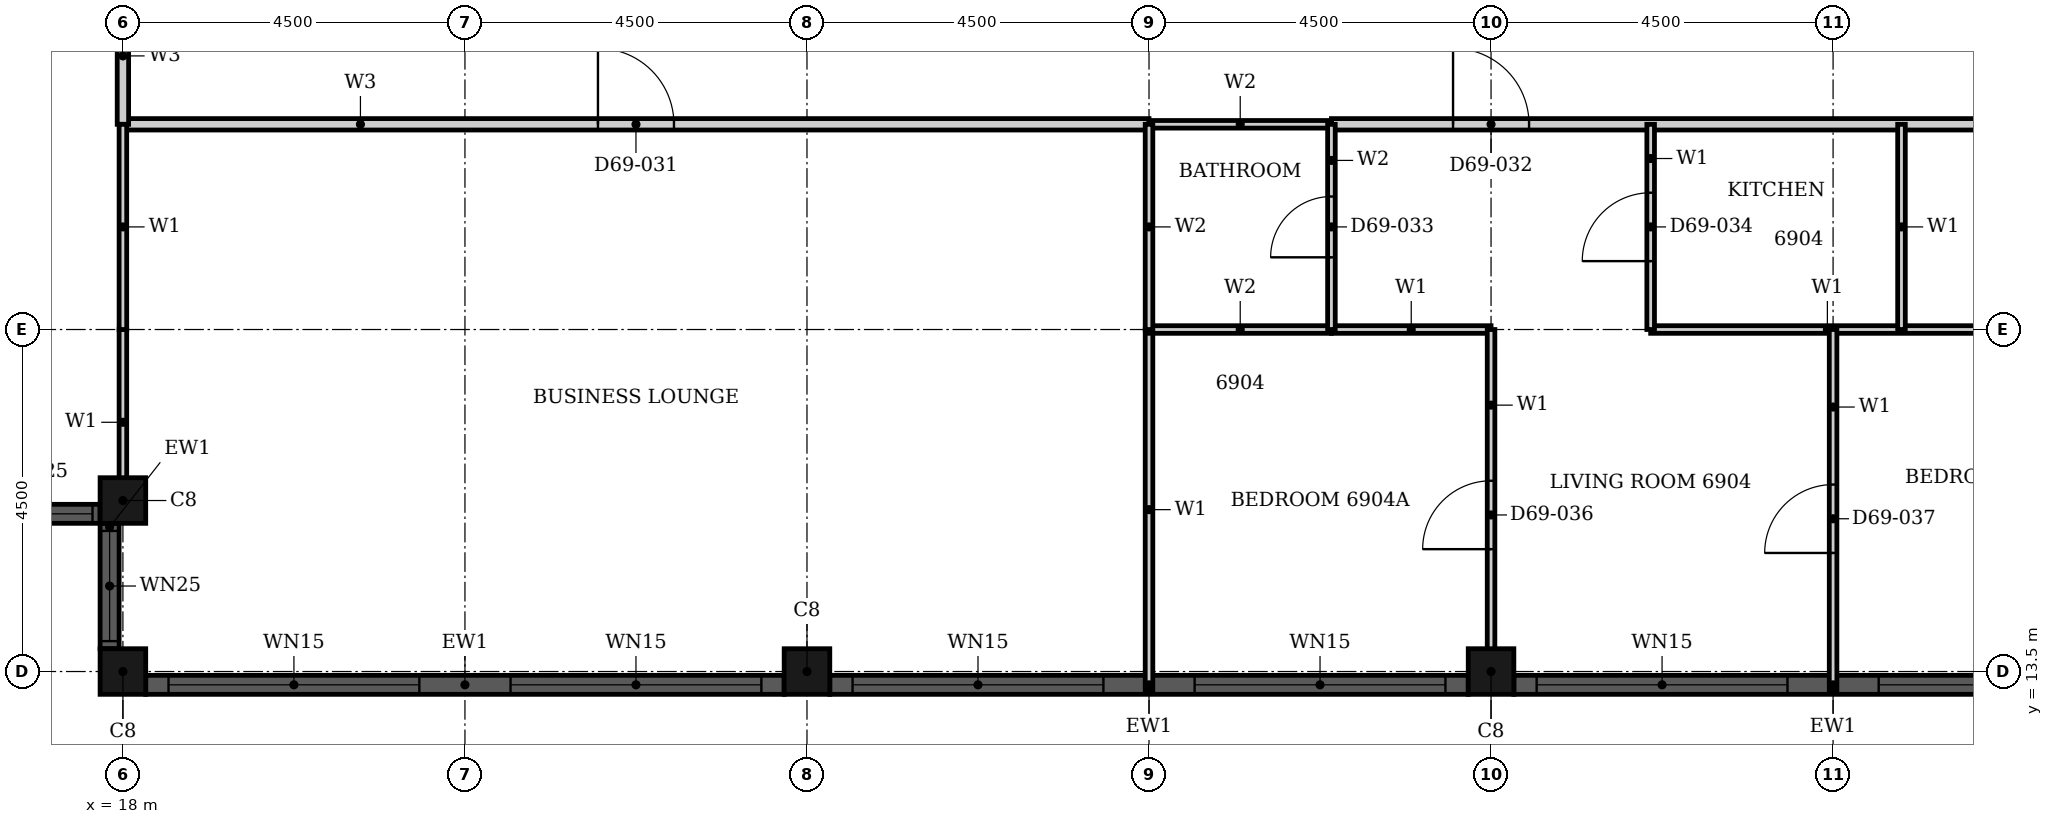
"""IFC4 building model, lengths in metres.
Left out: names, types, materials, properties, quantities, classifications, styles, units other than length and angle.
Written with IfcOpenShell. Run it as: python <this file> out.ifc"""

import sys

from ifc_helpers import new_model, si_unit, direction, frame, frame_2d, origin, origin_2d, place, context, subcontext, project, spatial, rectangle, hollow_rectangle, extrude, element, fill, save


model = new_model("IFC4")
c1 = context("Model", 3, precision=1e-05, world=origin(), true_north=direction((0.0, 1.0)))
c2 = subcontext(c1, "Body", "Model", "MODEL_VIEW")
j1 = project(units=[si_unit("LENGTHUNIT", "METRE"), si_unit("PLANEANGLEUNIT", "RADIAN")], contexts=[c1])
p1 = place(None, origin())
s1 = spatial("IfcSite", under=j1, at=p1, CompositionType="ELEMENT")
p2 = place(p1, origin())
s2 = spatial("IfcBuilding", under=s1, at=p2, CompositionType="ELEMENT")
p3 = place(p2, frame((0.0, 0.0, 271.2)))
s3 = spatial("IfcBuildingStorey", under=s2, at=p3, CompositionType="ELEMENT", Elevation=271.2)
for number, where, z_axis, x_axis in (
    (1, (18.0, 15.75, 0.0), (0.0, 0.0, 1.0), (1.0, 0.0, 0.0)),
    (2, (18.0, 13.5, 0.0), (0.0, 0.0, 1.0), (1.0, 0.0, 0.0)),
    (3, (27.0, 13.5, 0.0), (0.0, 0.0, 1.0), (1.0, 0.0, 0.0)),
    (4, (36.0, 13.5, 0.0), (0.0, 0.0, 1.0), (1.0, 0.0, 0.0)),
):
    element("IfcColumn", number, at=place(p3, frame(where, z_axis=z_axis, x_axis=x_axis)), inside=s3, PredefinedType="COLUMN", context=c2, shape_type="SweptSolid", body=[
        extrude(hollow_rectangle(XDim=0.6, YDim=0.6, WallThickness=0.02, at=origin_2d()), origin(), (0.0, 0.0, 1.0), 3.7),
    ])
p4 = place(p3, frame((16.05, 15.575, 0.0), z_axis=(0.0, 0.0, 1.0), x_axis=(1.0, 0.0, 0.0)))
e5 = element("IfcWall", 5, at=p4, inside=s3, PredefinedType="SOLIDWALL", context=c2, shape_type="SweptSolid", body=[
    extrude(rectangle(XDim=1.65, YDim=0.25, at=frame_2d((0.825, 0.0))), origin(), (0.0, 0.0, 1.0), 3.7),
])
p5 = place(p4, frame((0.1, 0.0, 0.9)))
e6 = element("IfcOpeningElement", 6, at=p5, cuts=e5, PredefinedType="OPENING", context=c2, shape_type="SweptSolid", body=[
    extrude(rectangle(XDim=1.45, YDim=1.85, at=frame_2d((0.725, 0.925))), frame((0.0, 0.135, 0.0), z_axis=(0.0, -1.0, 0.0), x_axis=(1.0, 0.0, 0.0)), (0.0, 0.0, 1.0), 0.27),
])
p6 = place(p3, frame((17.825, 15.45, 0.0), z_axis=(0.0, 0.0, 1.0), x_axis=(0.0, -1.0, 0.0)))
e7 = element("IfcWall", 7, at=p6, inside=s3, PredefinedType="SOLIDWALL", context=c2, shape_type="SweptSolid", body=[
    extrude(rectangle(XDim=1.65, YDim=0.25, at=frame_2d((0.825, 0.0))), origin(), (0.0, 0.0, 1.0), 3.7),
])
p7 = place(p6, frame((0.1, 0.0, 0.9)))
e8 = element("IfcOpeningElement", 8, at=p7, cuts=e7, PredefinedType="OPENING", context=c2, shape_type="SweptSolid", body=[
    extrude(rectangle(XDim=1.45, YDim=1.85, at=frame_2d((0.725, 0.925))), frame((0.0, 0.135, 0.0), z_axis=(0.0, -1.0, 0.0), x_axis=(1.0, 0.0, 0.0)), (0.0, 0.0, 1.0), 0.27),
])
p8 = place(p3, frame((18.3, 13.325, 0.0), z_axis=(0.0, 0.0, 1.0), x_axis=(1.0, 0.0, 0.0)))
e9 = element("IfcWall", 9, at=p8, inside=s3, PredefinedType="SOLIDWALL", context=c2, shape_type="SweptSolid", body=[
    extrude(rectangle(XDim=8.4, YDim=0.25, at=frame_2d((4.2, 0.0))), origin(), (0.0, 0.0, 1.0), 3.7),
])
p9 = place(p8, frame((0.3, 0.0, 0.45)))
e10 = element("IfcOpeningElement", 10, at=p9, cuts=e9, PredefinedType="OPENING", context=c2, shape_type="SweptSolid", body=[
    extrude(rectangle(XDim=3.3, YDim=2.3, at=frame_2d((1.65, 1.15))), frame((0.0, 0.135, 0.0), z_axis=(0.0, -1.0, 0.0), x_axis=(1.0, 0.0, 0.0)), (0.0, 0.0, 1.0), 0.27),
])
p10 = place(p8, frame((4.8, 0.0, 0.45)))
e11 = element("IfcOpeningElement", 11, at=p10, cuts=e9, PredefinedType="OPENING", context=c2, shape_type="SweptSolid", body=[
    extrude(rectangle(XDim=3.3, YDim=2.3, at=frame_2d((1.65, 1.15))), frame((0.0, 0.135, 0.0), z_axis=(0.0, -1.0, 0.0), x_axis=(1.0, 0.0, 0.0)), (0.0, 0.0, 1.0), 0.27),
])
p11 = place(p3, frame((27.3, 13.325, 0.0), z_axis=(0.0, 0.0, 1.0), x_axis=(1.0, 0.0, 0.0)))
e12 = element("IfcWall", 12, at=p11, inside=s3, PredefinedType="SOLIDWALL", context=c2, shape_type="SweptSolid", body=[
    extrude(rectangle(XDim=8.4, YDim=0.25, at=frame_2d((4.2, 0.0))), origin(), (0.0, 0.0, 1.0), 3.7),
])
p12 = place(p11, frame((0.3, 0.0, 0.45)))
e13 = element("IfcOpeningElement", 13, at=p12, cuts=e12, PredefinedType="OPENING", context=c2, shape_type="SweptSolid", body=[
    extrude(rectangle(XDim=3.3, YDim=2.3, at=frame_2d((1.65, 1.15))), frame((0.0, 0.135, 0.0), z_axis=(0.0, -1.0, 0.0), x_axis=(1.0, 0.0, 0.0)), (0.0, 0.0, 1.0), 0.27),
])
p13 = place(p11, frame((4.8, 0.0, 0.45)))
e14 = element("IfcOpeningElement", 14, at=p13, cuts=e12, PredefinedType="OPENING", context=c2, shape_type="SweptSolid", body=[
    extrude(rectangle(XDim=3.3, YDim=2.3, at=frame_2d((1.65, 1.15))), frame((0.0, 0.135, 0.0), z_axis=(0.0, -1.0, 0.0), x_axis=(1.0, 0.0, 0.0)), (0.0, 0.0, 1.0), 0.27),
])
p14 = place(p3, frame((36.3, 13.325, 0.0), z_axis=(0.0, 0.0, 1.0), x_axis=(1.0, 0.0, 0.0)))
e15 = element("IfcWall", 15, at=p14, inside=s3, PredefinedType="SOLIDWALL", context=c2, shape_type="SweptSolid", body=[
    extrude(rectangle(XDim=8.4, YDim=0.25, at=frame_2d((4.2, 0.0))), origin(), (0.0, 0.0, 1.0), 3.7),
])
p15 = place(p14, frame((0.3, 0.0, 0.45)))
e16 = element("IfcOpeningElement", 16, at=p15, cuts=e15, PredefinedType="OPENING", context=c2, shape_type="SweptSolid", body=[
    extrude(rectangle(XDim=3.3, YDim=2.3, at=frame_2d((1.65, 1.15))), frame((0.0, 0.135, 0.0), z_axis=(0.0, -1.0, 0.0), x_axis=(1.0, 0.0, 0.0)), (0.0, 0.0, 1.0), 0.27),
])
p16 = place(p14, frame((4.8, 0.0, 0.45)))
e17 = element("IfcOpeningElement", 17, at=p16, cuts=e15, PredefinedType="OPENING", context=c2, shape_type="SweptSolid", body=[
    extrude(rectangle(XDim=3.3, YDim=2.3, at=frame_2d((1.65, 1.15))), frame((0.0, 0.135, 0.0), z_axis=(0.0, -1.0, 0.0), x_axis=(1.0, 0.0, 0.0)), (0.0, 0.0, 1.0), 0.27),
])
p17 = place(p3, frame((18.0, 20.7, 0.0), z_axis=(0.0, 0.0, 1.0), x_axis=(1.0, 0.0, 0.0)))
e18 = element("IfcWall", 18, at=p17, inside=s3, PredefinedType="PARTITIONING", context=c2, shape_type="SweptSolid", body=[
    extrude(rectangle(XDim=13.5, YDim=0.15, at=frame_2d((6.75, 0.0))), origin(), (0.0, 0.0, 1.0), 3.4),
])
p18 = place(p17, frame((6.25, 0.0, 0.0)))
e19 = element("IfcOpeningElement", 19, at=p18, cuts=e18, PredefinedType="OPENING", context=c2, shape_type="SweptSolid", body=[
    extrude(rectangle(XDim=1.0, YDim=2.1, at=frame_2d((0.5, 1.05))), frame((0.0, 0.085, 0.0), z_axis=(0.0, -1.0, 0.0), x_axis=(1.0, 0.0, 0.0)), (0.0, 0.0, 1.0), 0.17),
])
p19 = place(p3, frame((33.9, 20.7, 0.0), z_axis=(0.0, 0.0, 1.0), x_axis=(1.0, 0.0, 0.0)))
e20 = element("IfcWall", 20, at=p19, inside=s3, PredefinedType="PARTITIONING", context=c2, shape_type="SweptSolid", body=[
    extrude(rectangle(XDim=15.65, YDim=0.15, at=frame_2d((7.825, 0.0))), origin(), (0.0, 0.0, 1.0), 3.4),
])
p20 = place(p19, frame((1.6, 0.0, 0.0)))
e21 = element("IfcOpeningElement", 21, at=p20, cuts=e20, PredefinedType="OPENING", context=c2, shape_type="SweptSolid", body=[
    extrude(rectangle(XDim=1.0, YDim=2.2, at=frame_2d((0.5, 1.1))), frame((0.0, 0.085, 0.0), z_axis=(0.0, -1.0, 0.0), x_axis=(1.0, 0.0, 0.0)), (0.0, 0.0, 1.0), 0.17),
])
p21 = place(p3, frame((18.0, 20.7, 0.0), z_axis=(0.0, 0.0, 1.0), x_axis=(0.0, 1.0, 0.0)))
e22 = element("IfcWall", 22, at=p21, inside=s3, PredefinedType="PARTITIONING", context=c2, shape_type="SweptSolid", body=[
    extrude(rectangle(XDim=1.8, YDim=0.15, at=frame_2d((0.9, 0.0))), origin(), (0.0, 0.0, 1.0), 3.4),
])
p22 = place(p3, frame((33.9, 18.0, 0.0), z_axis=(0.0, 0.0, 1.0), x_axis=(1.0, 0.0, 0.0)))
e23 = element("IfcWall", 23, at=p22, inside=s3, PredefinedType="PARTITIONING", context=c2, shape_type="SweptSolid", body=[
    extrude(rectangle(XDim=2.1, YDim=0.1, at=frame_2d((1.05, 0.0))), origin(), (0.0, 0.0, 1.0), 3.4),
])
p23 = place(p3, frame((38.1, 18.0, 0.0), z_axis=(0.0, 0.0, 1.0), x_axis=(1.0, 0.0, 0.0)))
e24 = element("IfcWall", 24, at=p23, inside=s3, PredefinedType="PARTITIONING", context=c2, shape_type="SweptSolid", body=[
    extrude(rectangle(XDim=6.9, YDim=0.1, at=frame_2d((3.45, 0.0))), origin(), (0.0, 0.0, 1.0), 3.4),
])
p24 = place(p23, frame((4.65, 0.0, 0.0)))
e25 = element("IfcOpeningElement", 25, at=p24, cuts=e24, PredefinedType="OPENING", context=c2, shape_type="SweptSolid", body=[
    extrude(rectangle(XDim=0.9, YDim=2.1, at=frame_2d((0.45, 1.05))), frame((0.0, 0.06, 0.0), z_axis=(0.0, -1.0, 0.0), x_axis=(1.0, 0.0, 0.0)), (0.0, 0.0, 1.0), 0.12),
])
p25 = place(p3, frame((18.0, 15.56, 0.0), z_axis=(0.0, 0.0, 1.0), x_axis=(0.0, 1.0, 0.0)))
e26 = element("IfcWall", 26, at=p25, inside=s3, PredefinedType="PARTITIONING", context=c2, shape_type="SweptSolid", body=[
    extrude(rectangle(XDim=2.439, YDim=0.1, at=frame_2d((1.219, 0.0))), origin(), (0.0, 0.0, 1.0), 3.4),
])
p26 = place(p3, frame((18.0, 18.0, 0.0), z_axis=(0.0, 0.0, 1.0), x_axis=(0.0, 1.0, 0.0)))
e27 = element("IfcWall", 27, at=p26, inside=s3, PredefinedType="PARTITIONING", context=c2, shape_type="SweptSolid", body=[
    extrude(rectangle(XDim=2.7, YDim=0.1, at=frame_2d((1.35, 0.0))), origin(), (0.0, 0.0, 1.0), 3.4),
])
p27 = place(p3, frame((31.5, 13.26, 0.0), z_axis=(0.0, 0.0, 1.0), x_axis=(0.0, 1.0, 0.0)))
e28 = element("IfcWall", 28, at=p27, inside=s3, PredefinedType="PARTITIONING", context=c2, shape_type="SweptSolid", body=[
    extrude(rectangle(XDim=4.74, YDim=0.1, at=frame_2d((2.37, 0.0))), origin(), (0.0, 0.0, 1.0), 3.4),
])
p28 = place(p3, frame((36.0, 13.31, 0.0), z_axis=(0.0, 0.0, 1.0), x_axis=(0.0, 1.0, 0.0)))
e29 = element("IfcWall", 29, at=p28, inside=s3, PredefinedType="PARTITIONING", context=c2, shape_type="SweptSolid", body=[
    extrude(rectangle(XDim=4.69, YDim=0.1, at=frame_2d((2.345, 0.0))), origin(), (0.0, 0.0, 1.0), 3.4),
])
p29 = place(p28, frame((1.8, 0.0, 0.0)))
e30 = element("IfcOpeningElement", 30, at=p29, cuts=e29, PredefinedType="OPENING", context=c2, shape_type="SweptSolid", body=[
    extrude(rectangle(XDim=0.9, YDim=2.1, at=frame_2d((0.45, 1.05))), frame((0.0, 0.06, 0.0), z_axis=(0.0, -1.0, 0.0), x_axis=(1.0, 0.0, 0.0)), (0.0, 0.0, 1.0), 0.12),
])
p30 = place(p3, frame((38.1, 18.0, 0.0), z_axis=(0.0, 0.0, 1.0), x_axis=(0.0, 1.0, 0.0)))
e31 = element("IfcWall", 31, at=p30, inside=s3, PredefinedType="PARTITIONING", context=c2, shape_type="SweptSolid", body=[
    extrude(rectangle(XDim=2.7, YDim=0.1, at=frame_2d((1.35, 0.0))), origin(), (0.0, 0.0, 1.0), 3.4),
])
p31 = place(p30, frame((0.9, 0.0, 0.0)))
e32 = element("IfcOpeningElement", 32, at=p31, cuts=e31, PredefinedType="OPENING", context=c2, shape_type="SweptSolid", body=[
    extrude(rectangle(XDim=0.9, YDim=2.1, at=frame_2d((0.45, 1.05))), frame((0.0, 0.06, 0.0), z_axis=(0.0, -1.0, 0.0), x_axis=(1.0, 0.0, 0.0)), (0.0, 0.0, 1.0), 0.12),
])
p32 = place(p3, frame((40.5, 13.26, 0.0), z_axis=(0.0, 0.0, 1.0), x_axis=(0.0, 1.0, 0.0)))
e33 = element("IfcWall", 33, at=p32, inside=s3, PredefinedType="PARTITIONING", context=c2, shape_type="SweptSolid", body=[
    extrude(rectangle(XDim=4.74, YDim=0.1, at=frame_2d((2.37, 0.0))), origin(), (0.0, 0.0, 1.0), 3.4),
])
p33 = place(p32, frame((1.8, 0.0, 0.0)))
e34 = element("IfcOpeningElement", 34, at=p33, cuts=e33, PredefinedType="OPENING", context=c2, shape_type="SweptSolid", body=[
    extrude(rectangle(XDim=0.9, YDim=2.1, at=frame_2d((0.45, 1.05))), frame((0.0, 0.06, 0.0), z_axis=(0.0, -1.0, 0.0), x_axis=(1.0, 0.0, 0.0)), (0.0, 0.0, 1.0), 0.12),
])
p34 = place(p3, frame((41.4, 18.0, 0.0), z_axis=(0.0, 0.0, 1.0), x_axis=(0.0, 1.0, 0.0)))
e35 = element("IfcWall", 35, at=p34, inside=s3, PredefinedType="PARTITIONING", context=c2, shape_type="SweptSolid", body=[
    extrude(rectangle(XDim=2.7, YDim=0.1, at=frame_2d((1.35, 0.0))), origin(), (0.0, 0.0, 1.0), 3.4),
])
for number, where, z_axis, x_axis in (
    (36, (31.5, 18.0, 0.0), (0.0, 0.0, 1.0), (1.0, 0.0, 0.0)),
    (37, (31.5, 20.7, 0.0), (0.0, 0.0, 1.0), (1.0, 0.0, 0.0)),
):
    element("IfcWall", number, at=place(p3, frame(where, z_axis=z_axis, x_axis=x_axis)), inside=s3, PredefinedType="PARTITIONING", context=c2, shape_type="SweptSolid", body=[
        extrude(rectangle(XDim=2.4, YDim=0.1, at=frame_2d((1.2, 0.0))), origin(), (0.0, 0.0, 1.0), 3.4),
    ])
p35 = place(p3, frame((31.5, 18.0, 0.0), z_axis=(0.0, 0.0, 1.0), x_axis=(0.0, 1.0, 0.0)))
e38 = element("IfcWall", 38, at=p35, inside=s3, PredefinedType="PARTITIONING", context=c2, shape_type="SweptSolid", body=[
    extrude(rectangle(XDim=2.7, YDim=0.1, at=frame_2d((1.35, 0.0))), origin(), (0.0, 0.0, 1.0), 3.4),
])
p36 = place(p3, frame((33.9, 18.0, 0.0), z_axis=(0.0, 0.0, 1.0), x_axis=(0.0, 1.0, 0.0)))
e39 = element("IfcWall", 39, at=p36, inside=s3, PredefinedType="PARTITIONING", context=c2, shape_type="SweptSolid", body=[
    extrude(rectangle(XDim=2.7, YDim=0.1, at=frame_2d((1.35, 0.0))), origin(), (0.0, 0.0, 1.0), 3.4),
])
p37 = place(p36, frame((0.95, 0.0, 0.0)))
e40 = element("IfcOpeningElement", 40, at=p37, cuts=e39, PredefinedType="OPENING", context=c2, shape_type="SweptSolid", body=[
    extrude(rectangle(XDim=0.8, YDim=2.1, at=frame_2d((0.4, 1.05))), frame((0.0, 0.06, 0.0), z_axis=(0.0, -1.0, 0.0), x_axis=(1.0, 0.0, 0.0)), (0.0, 0.0, 1.0), 0.12),
])
p38 = place(p5, origin())
e41 = element("IfcWindow", 41, at=p38, inside=s3, PartitioningType="SINGLE_PANEL", PredefinedType="WINDOW", context=c2, shape_type="SweptSolid", body=[
    extrude(rectangle(XDim=1.45, YDim=1.85, at=frame_2d((0.725, 0.925))), frame((0.0, 0.03, 0.0), z_axis=(0.0, -1.0, 0.0), x_axis=(1.0, 0.0, 0.0)), (0.0, 0.0, 1.0), 0.06),
])
fill(e6, e41)
p39 = place(p7, origin())
e42 = element("IfcWindow", 42, at=p39, inside=s3, PartitioningType="SINGLE_PANEL", PredefinedType="WINDOW", context=c2, shape_type="SweptSolid", body=[
    extrude(rectangle(XDim=1.45, YDim=1.85, at=frame_2d((0.725, 0.925))), frame((0.0, 0.03, 0.0), z_axis=(0.0, -1.0, 0.0), x_axis=(1.0, 0.0, 0.0)), (0.0, 0.0, 1.0), 0.06),
])
fill(e8, e42)
p40 = place(p9, origin())
e43 = element("IfcWindow", 43, at=p40, inside=s3, PartitioningType="SINGLE_PANEL", PredefinedType="WINDOW", context=c2, shape_type="SweptSolid", body=[
    extrude(rectangle(XDim=3.3, YDim=2.3, at=frame_2d((1.65, 1.15))), frame((0.0, 0.03, 0.0), z_axis=(0.0, -1.0, 0.0), x_axis=(1.0, 0.0, 0.0)), (0.0, 0.0, 1.0), 0.06),
])
fill(e10, e43)
p41 = place(p10, origin())
e44 = element("IfcWindow", 44, at=p41, inside=s3, PartitioningType="SINGLE_PANEL", PredefinedType="WINDOW", context=c2, shape_type="SweptSolid", body=[
    extrude(rectangle(XDim=3.3, YDim=2.3, at=frame_2d((1.65, 1.15))), frame((0.0, 0.03, 0.0), z_axis=(0.0, -1.0, 0.0), x_axis=(1.0, 0.0, 0.0)), (0.0, 0.0, 1.0), 0.06),
])
fill(e11, e44)
p42 = place(p12, origin())
e45 = element("IfcWindow", 45, at=p42, inside=s3, PartitioningType="SINGLE_PANEL", PredefinedType="WINDOW", context=c2, shape_type="SweptSolid", body=[
    extrude(rectangle(XDim=3.3, YDim=2.3, at=frame_2d((1.65, 1.15))), frame((0.0, 0.03, 0.0), z_axis=(0.0, -1.0, 0.0), x_axis=(1.0, 0.0, 0.0)), (0.0, 0.0, 1.0), 0.06),
])
fill(e13, e45)
p43 = place(p13, origin())
e46 = element("IfcWindow", 46, at=p43, inside=s3, PartitioningType="SINGLE_PANEL", PredefinedType="WINDOW", context=c2, shape_type="SweptSolid", body=[
    extrude(rectangle(XDim=3.3, YDim=2.3, at=frame_2d((1.65, 1.15))), frame((0.0, 0.03, 0.0), z_axis=(0.0, -1.0, 0.0), x_axis=(1.0, 0.0, 0.0)), (0.0, 0.0, 1.0), 0.06),
])
fill(e14, e46)
p44 = place(p15, origin())
e47 = element("IfcWindow", 47, at=p44, inside=s3, PartitioningType="SINGLE_PANEL", PredefinedType="WINDOW", context=c2, shape_type="SweptSolid", body=[
    extrude(rectangle(XDim=3.3, YDim=2.3, at=frame_2d((1.65, 1.15))), frame((0.0, 0.03, 0.0), z_axis=(0.0, -1.0, 0.0), x_axis=(1.0, 0.0, 0.0)), (0.0, 0.0, 1.0), 0.06),
])
fill(e16, e47)
p45 = place(p16, origin())
e48 = element("IfcWindow", 48, at=p45, inside=s3, PartitioningType="SINGLE_PANEL", PredefinedType="WINDOW", context=c2, shape_type="SweptSolid", body=[
    extrude(rectangle(XDim=3.3, YDim=2.3, at=frame_2d((1.65, 1.15))), frame((0.0, 0.03, 0.0), z_axis=(0.0, -1.0, 0.0), x_axis=(1.0, 0.0, 0.0)), (0.0, 0.0, 1.0), 0.06),
])
fill(e17, e48)
p46 = place(p18, origin())
e49 = element("IfcDoor", 49, at=p46, inside=s3, OperationType="SINGLE_SWING_RIGHT", PredefinedType="DOOR", context=c2, shape_type="SweptSolid", body=[
    extrude(rectangle(XDim=1.0, YDim=2.1, at=frame_2d((0.5, 1.05))), frame((0.0, 0.025, 0.0), z_axis=(0.0, -1.0, 0.0), x_axis=(1.0, 0.0, 0.0)), (0.0, 0.0, 1.0), 0.05),
])
fill(e19, e49)
p47 = place(p20, origin())
e50 = element("IfcDoor", 50, at=p47, inside=s3, OperationType="SINGLE_SWING_LEFT", PredefinedType="DOOR", context=c2, shape_type="SweptSolid", body=[
    extrude(rectangle(XDim=1.0, YDim=2.2, at=frame_2d((0.5, 1.1))), frame((0.0, 0.025, 0.0), z_axis=(0.0, -1.0, 0.0), x_axis=(1.0, 0.0, 0.0)), (0.0, 0.0, 1.0), 0.05),
])
fill(e21, e50)
p48 = place(p37, origin())
e51 = element("IfcDoor", 51, at=p48, inside=s3, OperationType="SINGLE_SWING_RIGHT", PredefinedType="DOOR", context=c2, shape_type="SweptSolid", body=[
    extrude(rectangle(XDim=0.8, YDim=2.1, at=frame_2d((0.4, 1.05))), frame((0.0, 0.025, 0.0), z_axis=(0.0, -1.0, 0.0), x_axis=(1.0, 0.0, 0.0)), (0.0, 0.0, 1.0), 0.05),
])
fill(e40, e51)
p49 = place(p31, origin())
e52 = element("IfcDoor", 52, at=p49, inside=s3, OperationType="SINGLE_SWING_RIGHT", PredefinedType="DOOR", context=c2, shape_type="SweptSolid", body=[
    extrude(rectangle(XDim=0.9, YDim=2.1, at=frame_2d((0.45, 1.05))), frame((0.0, 0.025, 0.0), z_axis=(0.0, -1.0, 0.0), x_axis=(1.0, 0.0, 0.0)), (0.0, 0.0, 1.0), 0.05),
])
fill(e32, e52)
p50 = place(p29, origin())
e53 = element("IfcDoor", 53, at=p50, inside=s3, OperationType="SINGLE_SWING_RIGHT", PredefinedType="DOOR", context=c2, shape_type="SweptSolid", body=[
    extrude(rectangle(XDim=0.9, YDim=2.1, at=frame_2d((0.45, 1.05))), frame((0.0, 0.025, 0.0), z_axis=(0.0, -1.0, 0.0), x_axis=(1.0, 0.0, 0.0)), (0.0, 0.0, 1.0), 0.05),
])
fill(e30, e53)
p51 = place(p33, origin())
e54 = element("IfcDoor", 54, at=p51, inside=s3, OperationType="SINGLE_SWING_RIGHT", PredefinedType="DOOR", context=c2, shape_type="SweptSolid", body=[
    extrude(rectangle(XDim=0.9, YDim=2.1, at=frame_2d((0.45, 1.05))), frame((0.0, 0.025, 0.0), z_axis=(0.0, -1.0, 0.0), x_axis=(1.0, 0.0, 0.0)), (0.0, 0.0, 1.0), 0.05),
])
fill(e34, e54)
save(model, sys.argv[1])
